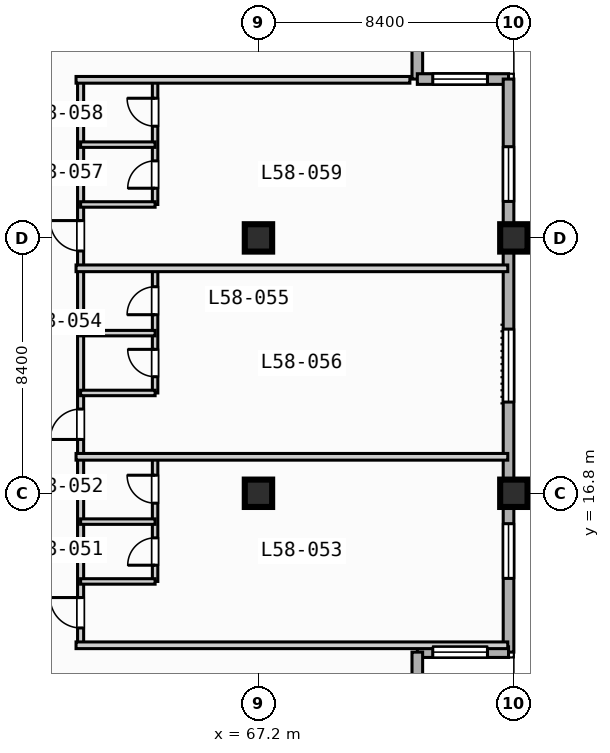
"""IFC4 building model, lengths in metres.
Left out: names, types, materials, properties, quantities, classifications, styles, units other than length and angle.
Written with IfcOpenShell. Run it as: python <this file> out.ifc"""

import sys

from ifc_helpers import new_model, si_unit, direction, frame, frame_2d, origin, origin_2d, place, context, subcontext, project, spatial, rectangle, extrude, element, fill, save


model = new_model("IFC4")
c1 = context("Model", 3, precision=1e-05, world=origin(), true_north=direction((0.0, 1.0)))
c2 = subcontext(c1, "Body", "Model", "MODEL_VIEW")
j1 = project(units=[si_unit("LENGTHUNIT", "METRE"), si_unit("PLANEANGLEUNIT", "RADIAN")], contexts=[c1])
p1 = place(None, origin())
s1 = spatial("IfcSite", under=j1, at=p1, CompositionType="ELEMENT")
p2 = place(p1, origin())
s2 = spatial("IfcBuilding", under=s1, at=p2, CompositionType="ELEMENT")
p3 = place(p2, frame((0.0, 0.0, 237.9)))
s3 = spatial("IfcBuildingStorey", under=s2, at=p3, CompositionType="ELEMENT", Elevation=237.9)
for number, where, z_axis, x_axis in (
    (1, (67.2, 16.8, 0.0), (0.0, 0.0, 1.0), (1.0, 0.0, 0.0)),
    (2, (67.2, 25.2, 0.0), (0.0, 0.0, 1.0), (1.0, 0.0, 0.0)),
    (3, (75.6, 16.8, 0.0), (0.0, 0.0, 1.0), (1.0, 0.0, 0.0)),
    (4, (75.6, 25.2, 0.0), (0.0, 0.0, 1.0), (1.0, 0.0, 0.0)),
):
    element("IfcColumn", number, at=place(p3, frame(where, z_axis=z_axis, x_axis=x_axis)), inside=s3, PredefinedType="COLUMN", context=c2, shape_type="SweptSolid", body=[
        extrude(rectangle(XDim=0.9, YDim=0.9, at=origin_2d()), origin(), (0.0, 0.0, 1.0), 3.7),
    ])
p4 = place(p3, frame((72.425, 33.425, 0.0), z_axis=(0.0, 0.0, 1.0), x_axis=(0.0, -1.0, 0.0)))
e5 = element("IfcWall", 5, at=p4, inside=s3, PredefinedType="STANDARD", context=c2, shape_type="SweptSolid", body=[
    extrude(rectangle(XDim=3.0, YDim=0.35, at=frame_2d((1.5, 0.0))), origin(), (0.0, 0.0, 1.0), 3.47),
])
p5 = place(p3, frame((72.425, 30.425, 0.0), z_axis=(0.0, 0.0, 1.0), x_axis=(1.0, 0.0, 0.0)))
e6 = element("IfcWall", 6, at=p5, inside=s3, PredefinedType="STANDARD", context=c2, shape_type="SweptSolid", body=[
    extrude(rectangle(XDim=3.0, YDim=0.35, at=frame_2d((1.5, 0.0))), origin(), (0.0, 0.0, 1.0), 3.47),
])
p6 = place(p5, frame((0.508, 0.0, 0.85)))
e7 = element("IfcOpeningElement", 7, at=p6, cuts=e6, PredefinedType="OPENING", context=c2, shape_type="SweptSolid", body=[
    extrude(rectangle(XDim=1.8, YDim=1.8, at=frame_2d((0.9, 0.9))), frame((0.0, 0.185, 0.0), z_axis=(0.0, -1.0, 0.0), x_axis=(1.0, 0.0, 0.0)), (0.0, 0.0, 1.0), 0.37),
])
p7 = place(p3, frame((75.425, 30.425, 0.0), z_axis=(0.0, 0.0, 1.0), x_axis=(0.0, -1.0, 0.0)))
e8 = element("IfcWall", 8, at=p7, inside=s3, PredefinedType="STANDARD", context=c2, shape_type="SweptSolid", body=[
    extrude(rectangle(XDim=18.85, YDim=0.35, at=frame_2d((9.425, 0.0))), origin(), (0.0, 0.0, 1.0), 3.47),
])
p8 = place(p7, frame((8.225, 0.0, 0.85)))
e9 = element("IfcOpeningElement", 9, at=p8, cuts=e8, PredefinedType="OPENING", context=c2, shape_type="SweptSolid", body=[
    extrude(rectangle(XDim=2.4, YDim=1.95, at=frame_2d((1.2, 0.975))), frame((0.0, 0.185, 0.0), z_axis=(0.0, -1.0, 0.0), x_axis=(1.0, 0.0, 0.0)), (0.0, 0.0, 1.0), 0.37),
])
p9 = place(p7, frame((14.625, 0.0, 0.85)))
e10 = element("IfcOpeningElement", 10, at=p9, cuts=e8, PredefinedType="OPENING", context=c2, shape_type="SweptSolid", body=[
    extrude(rectangle(XDim=1.8, YDim=1.8, at=frame_2d((0.9, 0.9))), frame((0.0, 0.185, 0.0), z_axis=(0.0, -1.0, 0.0), x_axis=(1.0, 0.0, 0.0)), (0.0, 0.0, 1.0), 0.37),
])
p10 = place(p7, frame((2.225, 0.0, 0.85)))
e11 = element("IfcOpeningElement", 11, at=p10, cuts=e8, PredefinedType="OPENING", context=c2, shape_type="SweptSolid", body=[
    extrude(rectangle(XDim=1.8, YDim=1.8, at=frame_2d((0.9, 0.9))), frame((0.0, 0.185, 0.0), z_axis=(0.0, -1.0, 0.0), x_axis=(1.0, 0.0, 0.0)), (0.0, 0.0, 1.0), 0.37),
])
p11 = place(p3, frame((75.425, 11.575, 0.0), z_axis=(0.0, 0.0, 1.0), x_axis=(-1.0, 0.0, 0.0)))
e12 = element("IfcWall", 12, at=p11, inside=s3, PredefinedType="STANDARD", context=c2, shape_type="SweptSolid", body=[
    extrude(rectangle(XDim=3.0, YDim=0.35, at=frame_2d((1.5, 0.0))), origin(), (0.0, 0.0, 1.0), 3.47),
])
p12 = place(p11, frame((0.692, 0.0, 0.85)))
e13 = element("IfcOpeningElement", 13, at=p12, cuts=e12, PredefinedType="OPENING", context=c2, shape_type="SweptSolid", body=[
    extrude(rectangle(XDim=1.8, YDim=1.8, at=frame_2d((0.9, 0.9))), frame((0.0, 0.185, 0.0), z_axis=(0.0, -1.0, 0.0), x_axis=(1.0, 0.0, 0.0)), (0.0, 0.0, 1.0), 0.37),
])
p13 = place(p3, frame((72.425, 11.575, 0.0), z_axis=(0.0, 0.0, 1.0), x_axis=(0.0, -1.0, 0.0)))
e14 = element("IfcWall", 14, at=p13, inside=s3, PredefinedType="STANDARD", context=c2, shape_type="SweptSolid", body=[
    extrude(rectangle(XDim=3.0, YDim=0.35, at=frame_2d((1.5, 0.0))), origin(), (0.0, 0.0, 1.0), 3.47),
])
p14 = place(p3, frame((61.35, 11.8, 0.0), z_axis=(0.0, 0.0, 1.0), x_axis=(0.0, 1.0, 0.0)))
e15 = element("IfcWall", 15, at=p14, inside=s3, PredefinedType="PARTITIONING", context=c2, shape_type="SweptSolid", body=[
    extrude(rectangle(XDim=18.6, YDim=0.2, at=frame_2d((9.3, 0.0))), origin(), (0.0, 0.0, 1.0), 3.47),
])
p15 = place(p14, frame((0.57, 0.0, 0.0)))
e16 = element("IfcOpeningElement", 16, at=p15, cuts=e15, PredefinedType="OPENING", context=c2, shape_type="SweptSolid", body=[
    extrude(rectangle(XDim=1.0, YDim=2.15, at=frame_2d((0.5, 1.075))), frame((0.0, 0.11, 0.0), z_axis=(0.0, -1.0, 0.0), x_axis=(1.0, 0.0, 0.0)), (0.0, 0.0, 1.0), 0.22),
])
p16 = place(p14, frame((6.77, 0.0, 0.0)))
e17 = element("IfcOpeningElement", 17, at=p16, cuts=e15, PredefinedType="OPENING", context=c2, shape_type="SweptSolid", body=[
    extrude(rectangle(XDim=1.0, YDim=2.15, at=frame_2d((0.5, 1.075))), frame((0.0, 0.11, 0.0), z_axis=(0.0, -1.0, 0.0), x_axis=(1.0, 0.0, 0.0)), (0.0, 0.0, 1.0), 0.22),
])
p17 = place(p14, frame((12.97, 0.0, 0.0)))
e18 = element("IfcOpeningElement", 18, at=p17, cuts=e15, PredefinedType="OPENING", context=c2, shape_type="SweptSolid", body=[
    extrude(rectangle(XDim=1.0, YDim=2.15, at=frame_2d((0.5, 1.075))), frame((0.0, 0.11, 0.0), z_axis=(0.0, -1.0, 0.0), x_axis=(1.0, 0.0, 0.0)), (0.0, 0.0, 1.0), 0.22),
])
p18 = place(p3, frame((61.2, 11.8, 0.0), z_axis=(0.0, 0.0, 1.0), x_axis=(1.0, 0.0, 0.0)))
e19 = element("IfcWall", 19, at=p18, inside=s3, PredefinedType="PARTITIONING", context=c2, shape_type="SweptSolid", body=[
    extrude(rectangle(XDim=14.2, YDim=0.22, at=frame_2d((7.1, 0.0))), origin(), (0.0, 0.0, 1.0), 3.47),
])
p19 = place(p3, frame((63.8, 13.9, 0.0), z_axis=(0.0, 0.0, 1.0), x_axis=(0.0, 1.0, 0.0)))
e20 = element("IfcWall", 20, at=p19, inside=s3, PredefinedType="PLUMBINGWALL", context=c2, shape_type="SweptSolid", body=[
    extrude(rectangle(XDim=4.1, YDim=0.18, at=frame_2d((2.05, 0.0))), origin(), (0.0, 0.0, 1.0), 3.47),
])
p20 = place(p19, frame((0.534, 0.0, 0.0)))
e21 = element("IfcOpeningElement", 21, at=p20, cuts=e20, PredefinedType="OPENING", context=c2, shape_type="SweptSolid", body=[
    extrude(rectangle(XDim=0.9, YDim=2.1, at=frame_2d((0.45, 1.05))), frame((0.0, 0.1, 0.0), z_axis=(0.0, -1.0, 0.0), x_axis=(1.0, 0.0, 0.0)), (0.0, 0.0, 1.0), 0.2),
])
p21 = place(p19, frame((2.574, 0.0, 0.0)))
e22 = element("IfcOpeningElement", 22, at=p21, cuts=e20, PredefinedType="OPENING", context=c2, shape_type="SweptSolid", body=[
    extrude(rectangle(XDim=0.92, YDim=2.1, at=frame_2d((0.46, 1.05))), frame((0.0, 0.1, 0.0), z_axis=(0.0, -1.0, 0.0), x_axis=(1.0, 0.0, 0.0)), (0.0, 0.0, 1.0), 0.2),
])
for number, where, z_axis, x_axis in (
    (23, (61.35, 13.9, 0.0), (0.0, 0.0, 1.0), (1.0, 0.0, 0.0)),
    (24, (61.35, 15.868, 0.0), (0.0, 0.0, 1.0), (1.0, 0.0, 0.0)),
):
    element("IfcWall", number, at=place(p3, frame(where, z_axis=z_axis, x_axis=x_axis)), inside=s3, PredefinedType="PLUMBINGWALL", context=c2, shape_type="SweptSolid", body=[
        extrude(rectangle(XDim=2.45, YDim=0.18, at=frame_2d((1.225, 0.0))), origin(), (0.0, 0.0, 1.0), 3.47),
    ])
p22 = place(p3, frame((61.2, 18.0, 0.0), z_axis=(0.0, 0.0, 1.0), x_axis=(1.0, 0.0, 0.0)))
e25 = element("IfcWall", 25, at=p22, inside=s3, PredefinedType="PARTITIONING", context=c2, shape_type="SweptSolid", body=[
    extrude(rectangle(XDim=14.2, YDim=0.22, at=frame_2d((7.1, 0.0))), origin(), (0.0, 0.0, 1.0), 3.47),
])
p23 = place(p3, frame((63.8, 20.1, 0.0), z_axis=(0.0, 0.0, 1.0), x_axis=(0.0, 1.0, 0.0)))
e26 = element("IfcWall", 26, at=p23, inside=s3, PredefinedType="PLUMBINGWALL", context=c2, shape_type="SweptSolid", body=[
    extrude(rectangle(XDim=4.1, YDim=0.18, at=frame_2d((2.05, 0.0))), origin(), (0.0, 0.0, 1.0), 3.47),
])
p24 = place(p23, frame((0.534, 0.0, 0.0)))
e27 = element("IfcOpeningElement", 27, at=p24, cuts=e26, PredefinedType="OPENING", context=c2, shape_type="SweptSolid", body=[
    extrude(rectangle(XDim=0.9, YDim=2.1, at=frame_2d((0.45, 1.05))), frame((0.0, 0.1, 0.0), z_axis=(0.0, -1.0, 0.0), x_axis=(1.0, 0.0, 0.0)), (0.0, 0.0, 1.0), 0.2),
])
p25 = place(p23, frame((2.574, 0.0, 0.0)))
e28 = element("IfcOpeningElement", 28, at=p25, cuts=e26, PredefinedType="OPENING", context=c2, shape_type="SweptSolid", body=[
    extrude(rectangle(XDim=0.92, YDim=2.1, at=frame_2d((0.46, 1.05))), frame((0.0, 0.1, 0.0), z_axis=(0.0, -1.0, 0.0), x_axis=(1.0, 0.0, 0.0)), (0.0, 0.0, 1.0), 0.2),
])
for number, where, z_axis, x_axis in (
    (29, (61.35, 20.1, 0.0), (0.0, 0.0, 1.0), (1.0, 0.0, 0.0)),
    (30, (61.35, 22.068, 0.0), (0.0, 0.0, 1.0), (1.0, 0.0, 0.0)),
):
    element("IfcWall", number, at=place(p3, frame(where, z_axis=z_axis, x_axis=x_axis)), inside=s3, PredefinedType="PLUMBINGWALL", context=c2, shape_type="SweptSolid", body=[
        extrude(rectangle(XDim=2.45, YDim=0.18, at=frame_2d((1.225, 0.0))), origin(), (0.0, 0.0, 1.0), 3.47),
    ])
p26 = place(p3, frame((61.2, 24.2, 0.0), z_axis=(0.0, 0.0, 1.0), x_axis=(1.0, 0.0, 0.0)))
e31 = element("IfcWall", 31, at=p26, inside=s3, PredefinedType="PARTITIONING", context=c2, shape_type="SweptSolid", body=[
    extrude(rectangle(XDim=14.2, YDim=0.22, at=frame_2d((7.1, 0.0))), origin(), (0.0, 0.0, 1.0), 3.47),
])
p27 = place(p3, frame((63.8, 26.3, 0.0), z_axis=(0.0, 0.0, 1.0), x_axis=(0.0, 1.0, 0.0)))
e32 = element("IfcWall", 32, at=p27, inside=s3, PredefinedType="PLUMBINGWALL", context=c2, shape_type="SweptSolid", body=[
    extrude(rectangle(XDim=4.1, YDim=0.18, at=frame_2d((2.05, 0.0))), origin(), (0.0, 0.0, 1.0), 3.47),
])
p28 = place(p27, frame((0.534, 0.0, 0.0)))
e33 = element("IfcOpeningElement", 33, at=p28, cuts=e32, PredefinedType="OPENING", context=c2, shape_type="SweptSolid", body=[
    extrude(rectangle(XDim=0.9, YDim=2.1, at=frame_2d((0.45, 1.05))), frame((0.0, 0.1, 0.0), z_axis=(0.0, -1.0, 0.0), x_axis=(1.0, 0.0, 0.0)), (0.0, 0.0, 1.0), 0.2),
])
p29 = place(p27, frame((2.574, 0.0, 0.0)))
e34 = element("IfcOpeningElement", 34, at=p29, cuts=e32, PredefinedType="OPENING", context=c2, shape_type="SweptSolid", body=[
    extrude(rectangle(XDim=0.92, YDim=2.1, at=frame_2d((0.46, 1.05))), frame((0.0, 0.1, 0.0), z_axis=(0.0, -1.0, 0.0), x_axis=(1.0, 0.0, 0.0)), (0.0, 0.0, 1.0), 0.2),
])
for number, where, z_axis, x_axis in (
    (35, (61.35, 26.3, 0.0), (0.0, 0.0, 1.0), (1.0, 0.0, 0.0)),
    (36, (61.35, 28.268, 0.0), (0.0, 0.0, 1.0), (1.0, 0.0, 0.0)),
):
    element("IfcWall", number, at=place(p3, frame(where, z_axis=z_axis, x_axis=x_axis)), inside=s3, PredefinedType="PLUMBINGWALL", context=c2, shape_type="SweptSolid", body=[
        extrude(rectangle(XDim=2.45, YDim=0.18, at=frame_2d((1.225, 0.0))), origin(), (0.0, 0.0, 1.0), 3.47),
    ])
p30 = place(p3, frame((61.2, 30.4, 0.0), z_axis=(0.0, 0.0, 1.0), x_axis=(1.0, 0.0, 0.0)))
e37 = element("IfcWall", 37, at=p30, inside=s3, PredefinedType="PARTITIONING", context=c2, shape_type="SweptSolid", body=[
    extrude(rectangle(XDim=10.98, YDim=0.22, at=frame_2d((5.49, 0.0))), origin(), (0.0, 0.0, 1.0), 3.47),
])
p31 = place(p6, origin())
e38 = element("IfcWindow", 38, at=p31, inside=s3, PartitioningType="SINGLE_PANEL", PredefinedType="WINDOW", context=c2, shape_type="SweptSolid", body=[
    extrude(rectangle(XDim=1.8, YDim=1.8, at=frame_2d((0.9, 0.9))), frame((0.0, 0.03, 0.0), z_axis=(0.0, -1.0, 0.0), x_axis=(1.0, 0.0, 0.0)), (0.0, 0.0, 1.0), 0.06),
])
fill(e7, e38)
p32 = place(p8, origin())
e39 = element("IfcWindow", 39, at=p32, inside=s3, PartitioningType="SINGLE_PANEL", PredefinedType="WINDOW", context=c2, shape_type="SweptSolid", body=[
    extrude(rectangle(XDim=2.4, YDim=1.95, at=frame_2d((1.2, 0.975))), frame((0.0, 0.03, 0.0), z_axis=(0.0, -1.0, 0.0), x_axis=(1.0, 0.0, 0.0)), (0.0, 0.0, 1.0), 0.06),
])
fill(e9, e39)
p33 = place(p9, origin())
e40 = element("IfcWindow", 40, at=p33, inside=s3, PartitioningType="SINGLE_PANEL", PredefinedType="WINDOW", context=c2, shape_type="SweptSolid", body=[
    extrude(rectangle(XDim=1.8, YDim=1.8, at=frame_2d((0.9, 0.9))), frame((0.0, 0.03, 0.0), z_axis=(0.0, -1.0, 0.0), x_axis=(1.0, 0.0, 0.0)), (0.0, 0.0, 1.0), 0.06),
])
fill(e10, e40)
p34 = place(p10, origin())
e41 = element("IfcWindow", 41, at=p34, inside=s3, PartitioningType="SINGLE_PANEL", PredefinedType="WINDOW", context=c2, shape_type="SweptSolid", body=[
    extrude(rectangle(XDim=1.8, YDim=1.8, at=frame_2d((0.9, 0.9))), frame((0.0, 0.03, 0.0), z_axis=(0.0, -1.0, 0.0), x_axis=(1.0, 0.0, 0.0)), (0.0, 0.0, 1.0), 0.06),
])
fill(e11, e41)
p35 = place(p12, origin())
e42 = element("IfcWindow", 42, at=p35, inside=s3, PartitioningType="SINGLE_PANEL", PredefinedType="WINDOW", context=c2, shape_type="SweptSolid", body=[
    extrude(rectangle(XDim=1.8, YDim=1.8, at=frame_2d((0.9, 0.9))), frame((0.0, 0.03, 0.0), z_axis=(0.0, -1.0, 0.0), x_axis=(1.0, 0.0, 0.0)), (0.0, 0.0, 1.0), 0.06),
])
fill(e13, e42)
p36 = place(p15, origin())
e43 = element("IfcDoor", 43, at=p36, inside=s3, OperationType="SINGLE_SWING_RIGHT", PredefinedType="DOOR", context=c2, shape_type="SweptSolid", body=[
    extrude(rectangle(XDim=1.0, YDim=2.15, at=frame_2d((0.5, 1.075))), frame((0.0, 0.025, 0.0), z_axis=(0.0, -1.0, 0.0), x_axis=(1.0, 0.0, 0.0)), (0.0, 0.0, 1.0), 0.05),
])
fill(e16, e43)
p37 = place(p16, origin())
e44 = element("IfcDoor", 44, at=p37, inside=s3, OperationType="SINGLE_SWING_LEFT", PredefinedType="DOOR", context=c2, shape_type="SweptSolid", body=[
    extrude(rectangle(XDim=1.0, YDim=2.15, at=frame_2d((0.5, 1.075))), frame((0.0, 0.025, 0.0), z_axis=(0.0, -1.0, 0.0), x_axis=(1.0, 0.0, 0.0)), (0.0, 0.0, 1.0), 0.05),
])
fill(e17, e44)
p38 = place(p17, origin())
e45 = element("IfcDoor", 45, at=p38, inside=s3, OperationType="SINGLE_SWING_RIGHT", PredefinedType="DOOR", context=c2, shape_type="SweptSolid", body=[
    extrude(rectangle(XDim=1.0, YDim=2.15, at=frame_2d((0.5, 1.075))), frame((0.0, 0.025, 0.0), z_axis=(0.0, -1.0, 0.0), x_axis=(1.0, 0.0, 0.0)), (0.0, 0.0, 1.0), 0.05),
])
fill(e18, e45)
p39 = place(p20, origin())
e46 = element("IfcDoor", 46, at=p39, inside=s3, OperationType="SINGLE_SWING_LEFT", PredefinedType="DOOR", context=c2, shape_type="SweptSolid", body=[
    extrude(rectangle(XDim=0.9, YDim=2.1, at=frame_2d((0.45, 1.05))), frame((0.0, 0.025, 0.0), z_axis=(0.0, -1.0, 0.0), x_axis=(1.0, 0.0, 0.0)), (0.0, 0.0, 1.0), 0.05),
])
fill(e21, e46)
p40 = place(p21, origin())
e47 = element("IfcDoor", 47, at=p40, inside=s3, OperationType="SINGLE_SWING_RIGHT", PredefinedType="DOOR", context=c2, shape_type="SweptSolid", body=[
    extrude(rectangle(XDim=0.92, YDim=2.1, at=frame_2d((0.46, 1.05))), frame((0.0, 0.025, 0.0), z_axis=(0.0, -1.0, 0.0), x_axis=(1.0, 0.0, 0.0)), (0.0, 0.0, 1.0), 0.05),
])
fill(e22, e47)
p41 = place(p24, origin())
e48 = element("IfcDoor", 48, at=p41, inside=s3, OperationType="SINGLE_SWING_RIGHT", PredefinedType="DOOR", context=c2, shape_type="SweptSolid", body=[
    extrude(rectangle(XDim=0.9, YDim=2.1, at=frame_2d((0.45, 1.05))), frame((0.0, 0.025, 0.0), z_axis=(0.0, -1.0, 0.0), x_axis=(1.0, 0.0, 0.0)), (0.0, 0.0, 1.0), 0.05),
])
fill(e27, e48)
p42 = place(p25, origin())
e49 = element("IfcDoor", 49, at=p42, inside=s3, OperationType="SINGLE_SWING_LEFT", PredefinedType="DOOR", context=c2, shape_type="SweptSolid", body=[
    extrude(rectangle(XDim=0.92, YDim=2.1, at=frame_2d((0.46, 1.05))), frame((0.0, 0.025, 0.0), z_axis=(0.0, -1.0, 0.0), x_axis=(1.0, 0.0, 0.0)), (0.0, 0.0, 1.0), 0.05),
])
fill(e28, e49)
p43 = place(p28, origin())
e50 = element("IfcDoor", 50, at=p43, inside=s3, OperationType="SINGLE_SWING_LEFT", PredefinedType="DOOR", context=c2, shape_type="SweptSolid", body=[
    extrude(rectangle(XDim=0.9, YDim=2.1, at=frame_2d((0.45, 1.05))), frame((0.0, 0.025, 0.0), z_axis=(0.0, -1.0, 0.0), x_axis=(1.0, 0.0, 0.0)), (0.0, 0.0, 1.0), 0.05),
])
fill(e33, e50)
p44 = place(p29, origin())
e51 = element("IfcDoor", 51, at=p44, inside=s3, OperationType="SINGLE_SWING_RIGHT", PredefinedType="DOOR", context=c2, shape_type="SweptSolid", body=[
    extrude(rectangle(XDim=0.92, YDim=2.1, at=frame_2d((0.46, 1.05))), frame((0.0, 0.025, 0.0), z_axis=(0.0, -1.0, 0.0), x_axis=(1.0, 0.0, 0.0)), (0.0, 0.0, 1.0), 0.05),
])
fill(e34, e51)
save(model, sys.argv[1])
